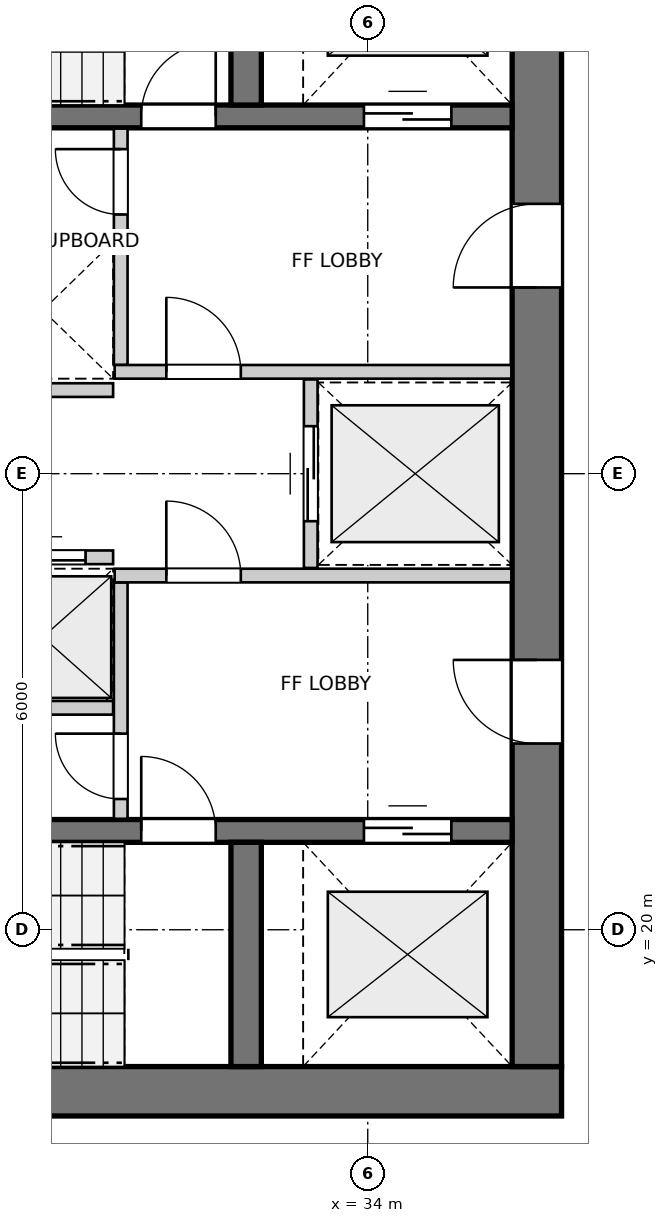
"""IFC4 building model, lengths in metres.
Left out: names, types, materials, properties, quantities, classifications, styles, units other than length and angle.
Written with IfcOpenShell. Run it as: python <this file> out.ifc"""

import sys

from ifc_helpers import new_model, si_unit, direction, frame, frame_2d, origin, place, context, subcontext, project, spatial, rectangle, extrude, source, transform, mapped, element, fill, save


model = new_model("IFC4")
c1 = context("Model", 3, precision=1e-05, world=origin(), true_north=direction((0.0, 1.0)))
c2 = subcontext(c1, "Body", "Model", "MODEL_VIEW")
j1 = project(units=[si_unit("LENGTHUNIT", "METRE"), si_unit("PLANEANGLEUNIT", "RADIAN")], contexts=[c1])
p1 = place(None, origin())
s1 = spatial("IfcSite", under=j1, at=p1, CompositionType="ELEMENT")
p2 = place(p1, origin())
s2 = spatial("IfcBuilding", under=s1, at=p2, CompositionType="ELEMENT")
p3 = place(p2, frame((0.0, 0.0, 86.4)))
s3 = spatial("IfcBuildingStorey", under=s2, at=p3, CompositionType="ELEMENT", Elevation=86.4)
p4 = place(p3, frame((24.15, 17.875, 0.0), z_axis=(0.0, 0.0, 1.0), x_axis=(1.0, 0.0, 0.0)))
e1 = element("IfcWall", 1, at=p4, inside=s3, PredefinedType="SHEAR", context=c2, shape_type="SweptSolid", body=[
    extrude(rectangle(XDim=12.4, YDim=0.65, at=frame_2d((6.2, 0.0))), origin(), (0.0, 0.0, 1.0), 2.95),
])
p5 = place(p3, frame((36.225, 18.2, 0.0), z_axis=(0.0, 0.0, 1.0), x_axis=(0.0, 1.0, 0.0)))
e2 = element("IfcWall", 2, at=p5, inside=s3, PredefinedType="SHEAR", context=c2, shape_type="SweptSolid", body=[
    extrude(rectangle(XDim=15.6, YDim=0.65, at=frame_2d((7.8, 0.0))), origin(), (0.0, 0.0, 1.0), 2.95),
])
p6 = place(p5, frame((4.25, 0.0, 0.0)))
e3 = element("IfcOpeningElement", 3, at=p6, cuts=e2, PredefinedType="OPENING", context=c2, shape_type="SweptSolid", body=[
    extrude(rectangle(XDim=1.1, YDim=2.15, at=frame_2d((0.55, 1.075))), frame((0.0, 0.335, 0.0), z_axis=(0.0, -1.0, 0.0), x_axis=(1.0, 0.0, 0.0)), (0.0, 0.0, 1.0), 0.67),
])
p7 = place(p5, frame((10.25, 0.0, 0.0)))
e4 = element("IfcOpeningElement", 4, at=p7, cuts=e2, PredefinedType="OPENING", context=c2, shape_type="SweptSolid", body=[
    extrude(rectangle(XDim=1.1, YDim=2.15, at=frame_2d((0.55, 1.075))), frame((0.0, 0.335, 0.0), z_axis=(0.0, -1.0, 0.0), x_axis=(1.0, 0.0, 0.0)), (0.0, 0.0, 1.0), 0.67),
])
p8 = place(p3, frame((24.8, 21.3, 0.0), z_axis=(0.0, 0.0, 1.0), x_axis=(1.0, 0.0, 0.0)))
e5 = element("IfcWall", 5, at=p8, inside=s3, PredefinedType="SHEAR", context=c2, shape_type="SweptSolid", body=[
    extrude(rectangle(XDim=11.1, YDim=0.3, at=frame_2d((5.55, 0.0))), origin(), (0.0, 0.0, 1.0), 2.95),
])
p9 = place(p8, frame((6.22, 0.0, 0.0)))
e6 = element("IfcOpeningElement", 6, at=p9, cuts=e5, PredefinedType="OPENING", context=c2, shape_type="SweptSolid", body=[
    extrude(rectangle(XDim=0.98, YDim=2.15, at=frame_2d((0.49, 1.075))), frame((0.0, 0.16, 0.0), z_axis=(0.0, -1.0, 0.0), x_axis=(1.0, 0.0, 0.0)), (0.0, 0.0, 1.0), 0.32),
])
p10 = place(p8, frame((9.15, 0.0, 0.0)))
e7 = element("IfcOpeningElement", 7, at=p10, cuts=e5, PredefinedType="OPENING", context=c2, shape_type="SweptSolid", body=[
    extrude(rectangle(XDim=1.15, YDim=2.15, at=frame_2d((0.575, 1.075))), frame((0.0, 0.16, 0.0), z_axis=(0.0, -1.0, 0.0), x_axis=(1.0, 0.0, 0.0)), (0.0, 0.0, 1.0), 0.32),
])
p11 = place(p3, frame((32.4, 18.2, 0.0), z_axis=(0.0, 0.0, 1.0), x_axis=(0.0, 1.0, 0.0)))
e8 = element("IfcWall", 8, at=p11, inside=s3, PredefinedType="SHEAR", context=c2, shape_type="SweptSolid", body=[
    extrude(rectangle(XDim=2.95, YDim=0.4, at=frame_2d((1.475, 0.0))), origin(), (0.0, 0.0, 1.0), 2.95),
])
p12 = place(p3, frame((24.8, 30.7, 0.0), z_axis=(0.0, 0.0, 1.0), x_axis=(1.0, 0.0, 0.0)))
e9 = element("IfcWall", 9, at=p12, inside=s3, PredefinedType="SHEAR", context=c2, shape_type="SweptSolid", body=[
    extrude(rectangle(XDim=11.1, YDim=0.3, at=frame_2d((5.55, 0.0))), origin(), (0.0, 0.0, 1.0), 2.95),
])
p13 = place(p12, frame((6.22, 0.0, 0.0)))
e10 = element("IfcOpeningElement", 10, at=p13, cuts=e9, PredefinedType="OPENING", context=c2, shape_type="SweptSolid", body=[
    extrude(rectangle(XDim=0.98, YDim=2.15, at=frame_2d((0.49, 1.075))), frame((0.0, 0.16, 0.0), z_axis=(0.0, -1.0, 0.0), x_axis=(1.0, 0.0, 0.0)), (0.0, 0.0, 1.0), 0.32),
])
p14 = place(p12, frame((9.15, 0.0, 0.0)))
e11 = element("IfcOpeningElement", 11, at=p14, cuts=e9, PredefinedType="OPENING", context=c2, shape_type="SweptSolid", body=[
    extrude(rectangle(XDim=1.15, YDim=2.15, at=frame_2d((0.575, 1.075))), frame((0.0, 0.16, 0.0), z_axis=(0.0, -1.0, 0.0), x_axis=(1.0, 0.0, 0.0)), (0.0, 0.0, 1.0), 0.32),
])
p15 = place(p3, frame((32.4, 30.85, 0.0), z_axis=(0.0, 0.0, 1.0), x_axis=(0.0, 1.0, 0.0)))
e12 = element("IfcWall", 12, at=p15, inside=s3, PredefinedType="SHEAR", context=c2, shape_type="SweptSolid", body=[
    extrude(rectangle(XDim=2.95, YDim=0.4, at=frame_2d((1.475, 0.0))), origin(), (0.0, 0.0, 1.0), 2.95),
])
p16 = place(p3, frame((30.75, 21.46, 0.0), z_axis=(0.0, 0.0, 1.0), x_axis=(0.0, 1.0, 0.0)))
e13 = element("IfcWall", 13, at=p16, inside=s3, PredefinedType="PARTITIONING", context=c2, shape_type="SweptSolid", body=[
    extrude(rectangle(XDim=3.11, YDim=0.18, at=frame_2d((1.555, 0.0))), origin(), (0.0, 0.0, 1.0), 2.95),
])
p17 = place(p16, frame((0.26, 0.0, 0.0)))
e14 = element("IfcOpeningElement", 14, at=p17, cuts=e13, PredefinedType="OPENING", context=c2, shape_type="SweptSolid", body=[
    extrude(rectangle(XDim=0.86, YDim=2.05, at=frame_2d((0.43, 1.025))), frame((0.0, 0.1, 0.0), z_axis=(0.0, -1.0, 0.0), x_axis=(1.0, 0.0, 0.0)), (0.0, 0.0, 1.0), 0.2),
])
p18 = place(p3, frame((30.67, 24.66, 0.0), z_axis=(0.0, 0.0, 1.0), x_axis=(1.0, 0.0, 0.0)))
e15 = element("IfcWall", 15, at=p18, inside=s3, PredefinedType="PARTITIONING", context=c2, shape_type="SweptSolid", body=[
    extrude(rectangle(XDim=5.22, YDim=0.18, at=frame_2d((2.61, 0.0))), origin(), (0.0, 0.0, 1.0), 2.95),
])
p19 = place(p18, frame((0.68, 0.0, 0.0)))
e16 = element("IfcOpeningElement", 16, at=p19, cuts=e15, PredefinedType="OPENING", context=c2, shape_type="SweptSolid", body=[
    extrude(rectangle(XDim=0.98, YDim=2.15, at=frame_2d((0.49, 1.075))), frame((0.0, 0.1, 0.0), z_axis=(0.0, -1.0, 0.0), x_axis=(1.0, 0.0, 0.0)), (0.0, 0.0, 1.0), 0.2),
])
p20 = place(p3, frame((30.75, 27.43, 0.0), z_axis=(0.0, 0.0, 1.0), x_axis=(0.0, 1.0, 0.0)))
e17 = element("IfcWall", 17, at=p20, inside=s3, PredefinedType="PARTITIONING", context=c2, shape_type="SweptSolid", body=[
    extrude(rectangle(XDim=3.11, YDim=0.18, at=frame_2d((1.555, 0.0))), origin(), (0.0, 0.0, 1.0), 2.95),
])
p21 = place(p20, frame((1.98, 0.0, 0.0)))
e18 = element("IfcOpeningElement", 18, at=p21, cuts=e17, PredefinedType="OPENING", context=c2, shape_type="SweptSolid", body=[
    extrude(rectangle(XDim=0.86, YDim=2.05, at=frame_2d((0.43, 1.025))), frame((0.0, 0.1, 0.0), z_axis=(0.0, -1.0, 0.0), x_axis=(1.0, 0.0, 0.0)), (0.0, 0.0, 1.0), 0.2),
])
p22 = place(p3, frame((30.67, 27.34, 0.0), z_axis=(0.0, 0.0, 1.0), x_axis=(1.0, 0.0, 0.0)))
e19 = element("IfcWall", 19, at=p22, inside=s3, PredefinedType="PARTITIONING", context=c2, shape_type="SweptSolid", body=[
    extrude(rectangle(XDim=5.22, YDim=0.18, at=frame_2d((2.61, 0.0))), origin(), (0.0, 0.0, 1.0), 2.95),
])
p23 = place(p22, frame((0.68, 0.0, 0.0)))
e20 = element("IfcOpeningElement", 20, at=p23, cuts=e19, PredefinedType="OPENING", context=c2, shape_type="SweptSolid", body=[
    extrude(rectangle(XDim=0.98, YDim=2.15, at=frame_2d((0.49, 1.075))), frame((0.0, 0.1, 0.0), z_axis=(0.0, -1.0, 0.0), x_axis=(1.0, 0.0, 0.0)), (0.0, 0.0, 1.0), 0.2),
])
p24 = place(p3, frame((33.25, 24.76, 0.0), z_axis=(0.0, 0.0, 1.0), x_axis=(0.0, 1.0, 0.0)))
e21 = element("IfcWall", 21, at=p24, inside=s3, PredefinedType="PARTITIONING", context=c2, shape_type="SweptSolid", body=[
    extrude(rectangle(XDim=2.48, YDim=0.18, at=frame_2d((1.24, 0.0))), origin(), (0.0, 0.0, 1.0), 2.95),
])
p25 = place(p24, frame((0.615, 0.0, 0.0)))
e22 = element("IfcOpeningElement", 22, at=p25, cuts=e21, PredefinedType="OPENING", context=c2, shape_type="SweptSolid", body=[
    extrude(rectangle(XDim=1.25, YDim=2.15, at=frame_2d((0.625, 1.075))), frame((0.0, 0.1, 0.0), z_axis=(0.0, -1.0, 0.0), x_axis=(1.0, 0.0, 0.0)), (0.0, 0.0, 1.0), 0.2),
])
p26 = place(p3, frame((24.81, 22.92, 0.0), z_axis=(0.0, 0.0, 1.0), x_axis=(1.0, 0.0, 0.0)))
e23 = element("IfcWall", 23, at=p26, inside=s3, PredefinedType="PARTITIONING", context=c2, shape_type="SweptSolid", body=[
    extrude(rectangle(XDim=5.84, YDim=0.18, at=frame_2d((2.92, 0.0))), origin(), (0.0, 0.0, 1.0), 2.95),
])
p27 = place(p3, frame((28.825, 24.9, 0.0), z_axis=(0.0, 0.0, 1.0), x_axis=(1.0, 0.0, 0.0)))
e24 = element("IfcWall", 24, at=p27, inside=s3, PredefinedType="PARTITIONING", context=c2, shape_type="SweptSolid", body=[
    extrude(rectangle(XDim=1.825, YDim=0.18, at=frame_2d((0.913, 0.0))), origin(), (0.0, 0.0, 1.0), 2.95),
])
p28 = place(p27, frame((0.363, 0.0, 0.0)))
e25 = element("IfcOpeningElement", 25, at=p28, cuts=e24, PredefinedType="OPENING", context=c2, shape_type="SweptSolid", body=[
    extrude(rectangle(XDim=1.1, YDim=2.15, at=frame_2d((0.55, 1.075))), frame((0.0, 0.1, 0.0), z_axis=(0.0, -1.0, 0.0), x_axis=(1.0, 0.0, 0.0)), (0.0, 0.0, 1.0), 0.2),
])
p29 = place(p3, frame((24.81, 29.08, 0.0), z_axis=(0.0, 0.0, 1.0), x_axis=(1.0, 0.0, 0.0)))
e26 = element("IfcWall", 26, at=p29, inside=s3, PredefinedType="PARTITIONING", context=c2, shape_type="SweptSolid", body=[
    extrude(rectangle(XDim=5.84, YDim=0.18, at=frame_2d((2.92, 0.0))), origin(), (0.0, 0.0, 1.0), 2.95),
])
p30 = place(p3, frame((28.825, 27.1, 0.0), z_axis=(0.0, 0.0, 1.0), x_axis=(1.0, 0.0, 0.0)))
e27 = element("IfcWall", 27, at=p30, inside=s3, PredefinedType="PARTITIONING", context=c2, shape_type="SweptSolid", body=[
    extrude(rectangle(XDim=1.825, YDim=0.18, at=frame_2d((0.913, 0.0))), origin(), (0.0, 0.0, 1.0), 2.95),
])
m1 = source(origin(), c2, "Body", "SweptSolid", [
    extrude(rectangle(XDim=0.98, YDim=2.15, at=frame_2d((0.49, 1.075))), frame((0.0, 0.025, 0.0), z_axis=(0.0, -1.0, 0.0), x_axis=(1.0, 0.0, 0.0)), (0.0, 0.0, 1.0), 0.05),
])
p31 = place(p9, origin())
e28 = element("IfcDoor", 28, at=p31, inside=s3, OperationType="SINGLE_SWING_LEFT", PredefinedType="DOOR", context=c2, shape_type="MappedRepresentation", body=[
    mapped(m1, transform((0.0, 0.0, 0.0), x_axis=(1.0, 0.0, 0.0), y_axis=(0.0, 1.0, 0.0), z_axis=(0.0, 0.0, 1.0), scale=1.0)),
])
fill(e6, e28)
m2 = source(origin(), c2, "Body", "SweptSolid", [
    extrude(rectangle(XDim=1.15, YDim=2.15, at=frame_2d((0.575, 1.075))), frame((0.0, 0.025, 0.0), z_axis=(0.0, -1.0, 0.0), x_axis=(1.0, 0.0, 0.0)), (0.0, 0.0, 1.0), 0.05),
])
p32 = place(p10, origin())
e29 = element("IfcDoor", 29, at=p32, inside=s3, OperationType="DOUBLE_DOOR_SLIDING", PredefinedType="DOOR", context=c2, shape_type="MappedRepresentation", body=[
    mapped(m2, transform((0.0, 0.0, 0.0), x_axis=(1.0, 0.0, 0.0), y_axis=(0.0, 1.0, 0.0), z_axis=(0.0, 0.0, 1.0), scale=1.0)),
])
fill(e7, e29)
p33 = place(p13, origin())
e30 = element("IfcDoor", 30, at=p33, inside=s3, OperationType="SINGLE_SWING_RIGHT", PredefinedType="DOOR", context=c2, shape_type="MappedRepresentation", body=[
    mapped(m1, transform((0.0, 0.0, 0.0), x_axis=(1.0, 0.0, 0.0), y_axis=(0.0, 1.0, 0.0), z_axis=(0.0, 0.0, 1.0), scale=1.0)),
])
fill(e10, e30)
p34 = place(p14, origin())
e31 = element("IfcDoor", 31, at=p34, inside=s3, OperationType="DOUBLE_DOOR_SLIDING", PredefinedType="DOOR", context=c2, shape_type="MappedRepresentation", body=[
    mapped(m2, transform((0.0, 0.0, 0.0), x_axis=(1.0, 0.0, 0.0), y_axis=(0.0, 1.0, 0.0), z_axis=(0.0, 0.0, 1.0), scale=1.0)),
])
fill(e11, e31)
m3 = source(origin(), c2, "Body", "SweptSolid", [
    extrude(rectangle(XDim=1.1, YDim=2.15, at=frame_2d((0.55, 1.075))), frame((0.0, 0.025, 0.0), z_axis=(0.0, -1.0, 0.0), x_axis=(1.0, 0.0, 0.0)), (0.0, 0.0, 1.0), 0.05),
])
p35 = place(p6, origin())
e32 = element("IfcDoor", 32, at=p35, inside=s3, OperationType="SINGLE_SWING_RIGHT", PredefinedType="DOOR", context=c2, shape_type="MappedRepresentation", body=[
    mapped(m3, transform((0.0, 0.0, 0.0), x_axis=(1.0, 0.0, 0.0), y_axis=(0.0, 1.0, 0.0), z_axis=(0.0, 0.0, 1.0), scale=1.0)),
])
fill(e3, e32)
p36 = place(p7, origin())
e33 = element("IfcDoor", 33, at=p36, inside=s3, OperationType="SINGLE_SWING_LEFT", PredefinedType="DOOR", context=c2, shape_type="MappedRepresentation", body=[
    mapped(m3, transform((0.0, 0.0, 0.0), x_axis=(1.0, 0.0, 0.0), y_axis=(0.0, 1.0, 0.0), z_axis=(0.0, 0.0, 1.0), scale=1.0)),
])
fill(e4, e33)
m4 = source(origin(), c2, "Body", "SweptSolid", [
    extrude(rectangle(XDim=0.86, YDim=2.05, at=frame_2d((0.43, 1.025))), frame((0.0, 0.025, 0.0), z_axis=(0.0, -1.0, 0.0), x_axis=(1.0, 0.0, 0.0)), (0.0, 0.0, 1.0), 0.05),
])
p37 = place(p17, origin())
e34 = element("IfcDoor", 34, at=p37, inside=s3, OperationType="SINGLE_SWING_RIGHT", PredefinedType="DOOR", context=c2, shape_type="MappedRepresentation", body=[
    mapped(m4, transform((0.0, 0.0, 0.0), x_axis=(1.0, 0.0, 0.0), y_axis=(0.0, 1.0, 0.0), z_axis=(0.0, 0.0, 1.0), scale=1.0)),
])
fill(e14, e34)
p38 = place(p19, origin())
e35 = element("IfcDoor", 35, at=p38, inside=s3, OperationType="SINGLE_SWING_LEFT", PredefinedType="DOOR", context=c2, shape_type="MappedRepresentation", body=[
    mapped(m1, transform((0.0, 0.0, 0.0), x_axis=(1.0, 0.0, 0.0), y_axis=(0.0, 1.0, 0.0), z_axis=(0.0, 0.0, 1.0), scale=1.0)),
])
fill(e16, e35)
p39 = place(p21, origin())
e36 = element("IfcDoor", 36, at=p39, inside=s3, OperationType="SINGLE_SWING_RIGHT", PredefinedType="DOOR", context=c2, shape_type="MappedRepresentation", body=[
    mapped(m4, transform((0.0, 0.0, 0.0), x_axis=(1.0, 0.0, 0.0), y_axis=(0.0, 1.0, 0.0), z_axis=(0.0, 0.0, 1.0), scale=1.0)),
])
fill(e18, e36)
p40 = place(p23, origin())
e37 = element("IfcDoor", 37, at=p40, inside=s3, OperationType="SINGLE_SWING_LEFT", PredefinedType="DOOR", context=c2, shape_type="MappedRepresentation", body=[
    mapped(m1, transform((0.0, 0.0, 0.0), x_axis=(1.0, 0.0, 0.0), y_axis=(0.0, 1.0, 0.0), z_axis=(0.0, 0.0, 1.0), scale=1.0)),
])
fill(e20, e37)
m5 = source(origin(), c2, "Body", "SweptSolid", [
    extrude(rectangle(XDim=1.25, YDim=2.15, at=frame_2d((0.625, 1.075))), frame((0.0, 0.025, 0.0), z_axis=(0.0, -1.0, 0.0), x_axis=(1.0, 0.0, 0.0)), (0.0, 0.0, 1.0), 0.05),
])
p41 = place(p25, origin())
e38 = element("IfcDoor", 38, at=p41, inside=s3, OperationType="DOUBLE_DOOR_SLIDING", PredefinedType="DOOR", context=c2, shape_type="MappedRepresentation", body=[
    mapped(m5, transform((0.0, 0.0, 0.0), x_axis=(1.0, 0.0, 0.0), y_axis=(0.0, 1.0, 0.0), z_axis=(0.0, 0.0, 1.0), scale=1.0)),
])
fill(e22, e38)
p42 = place(p28, origin())
e39 = element("IfcDoor", 39, at=p42, inside=s3, OperationType="DOUBLE_DOOR_SLIDING", PredefinedType="DOOR", context=c2, shape_type="MappedRepresentation", body=[
    mapped(m3, transform((0.0, 0.0, 0.0), x_axis=(1.0, 0.0, 0.0), y_axis=(0.0, 1.0, 0.0), z_axis=(0.0, 0.0, 1.0), scale=1.0)),
])
fill(e25, e39)
save(model, sys.argv[1])
